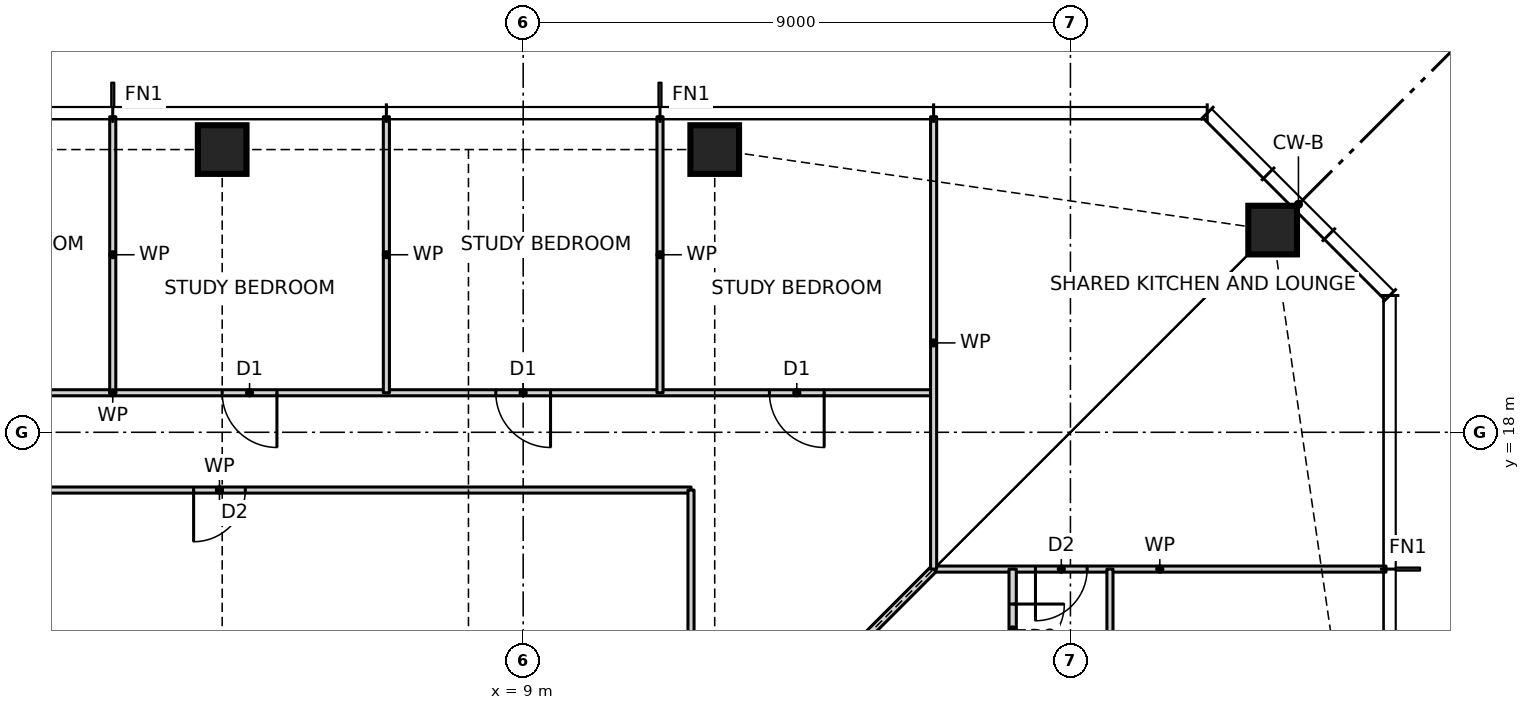
"""IFC4 building model, lengths in metres.
Left out: names, types, materials, properties, quantities, classifications, styles, units other than length and angle.
Written with IfcOpenShell. Run it as: python <this file> out.ifc"""

import sys

from ifc_helpers import new_model, si_unit, direction, frame, frame_2d, origin, origin_2d, place, context, subcontext, project, spatial, rectangle, hollow_rectangle, extrude, element, fill, save


model = new_model("IFC4")
c1 = context("Model", 3, precision=1e-05, world=origin(), true_north=direction((0.0, 1.0)))
c2 = subcontext(c1, "Body", "Model", "MODEL_VIEW")
j1 = project(units=[si_unit("LENGTHUNIT", "METRE"), si_unit("PLANEANGLEUNIT", "RADIAN")], contexts=[c1])
p1 = place(None, origin())
s1 = spatial("IfcSite", under=j1, at=p1, CompositionType="ELEMENT")
p2 = place(p1, origin())
s2 = spatial("IfcBuilding", under=s1, at=p2, CompositionType="ELEMENT")
p3 = place(p2, frame((0.0, 0.0, 46.5)))
s3 = spatial("IfcBuildingStorey", under=s2, at=p3, CompositionType="ELEMENT", Elevation=46.5)
for number, where, z_axis, x_axis in (
    (1, (21.326, 21.326, 0.0), (0.0, 0.0, 1.0), (1.0, 0.0, 0.0)),
    (2, (12.15, 22.65, 0.0), (0.0, 0.0, 1.0), (1.0, 0.0, 0.0)),
    (3, (4.05, 22.65, 0.0), (0.0, 0.0, 1.0), (1.0, 0.0, 0.0)),
):
    element("IfcColumn", number, at=place(p3, frame(where, z_axis=z_axis, x_axis=x_axis)), inside=s3, PredefinedType="COLUMN", context=c2, shape_type="SweptSolid", body=[
        extrude(hollow_rectangle(XDim=0.8, YDim=0.8, WallThickness=0.09, at=origin_2d()), origin(), (0.0, 0.0, 1.0), 3.5),
    ])
p4 = place(p3, frame((15.75, 15.75, 0.0), z_axis=(0.0, 0.0, 1.0), x_axis=(1.0, 0.0, 0.0)))
e4 = element("IfcWall", 4, at=p4, inside=s3, PredefinedType="PARTITIONING", context=c2, shape_type="SweptSolid", body=[
    extrude(rectangle(XDim=7.44, YDim=0.1, at=frame_2d((3.72, 0.0))), origin(), (0.0, 0.0, 1.0), 3.27),
])
p5 = place(p4, frame((1.675, 0.0, 0.0)))
e5 = element("IfcOpeningElement", 5, at=p5, cuts=e4, PredefinedType="OPENING", context=c2, shape_type="SweptSolid", body=[
    extrude(rectangle(XDim=0.85, YDim=2.1, at=frame_2d((0.425, 1.05))), frame((0.0, 0.06, 0.0), z_axis=(0.0, -1.0, 0.0), x_axis=(1.0, 0.0, 0.0)), (0.0, 0.0, 1.0), 0.12),
])
p6 = place(p3, frame((-3.75, 17.05, 0.0), z_axis=(0.0, 0.0, 1.0), x_axis=(1.0, 0.0, 0.0)))
e6 = element("IfcWall", 6, at=p6, inside=s3, PredefinedType="PARTITIONING", context=c2, shape_type="SweptSolid", body=[
    extrude(rectangle(XDim=15.51, YDim=0.1, at=frame_2d((7.755, 0.0))), origin(), (0.0, 0.0, 1.0), 3.27),
])
p7 = place(p6, frame((7.33, 0.0, 0.0)))
e7 = element("IfcOpeningElement", 7, at=p7, cuts=e6, PredefinedType="OPENING", context=c2, shape_type="SweptSolid", body=[
    extrude(rectangle(XDim=0.85, YDim=2.1, at=frame_2d((0.425, 1.05))), frame((0.0, 0.06, 0.0), z_axis=(0.0, -1.0, 0.0), x_axis=(1.0, 0.0, 0.0)), (0.0, 0.0, 1.0), 0.12),
])
p8 = place(p3, frame((-11.25, 18.65, 0.0), z_axis=(0.0, 0.0, 1.0), x_axis=(1.0, 0.0, 0.0)))
e8 = element("IfcWall", 8, at=p8, inside=s3, PredefinedType="PARTITIONING", context=c2, shape_type="SweptSolid", body=[
    extrude(rectangle(XDim=27.0, YDim=0.1, at=frame_2d((13.5, 0.0))), origin(), (0.0, 0.0, 1.0), 3.27),
])
p9 = place(p8, frame((24.3, 0.0, 0.0)))
e9 = element("IfcOpeningElement", 9, at=p9, cuts=e8, PredefinedType="OPENING", context=c2, shape_type="SweptSolid", body=[
    extrude(rectangle(XDim=0.9, YDim=2.1, at=frame_2d((0.45, 1.05))), frame((0.0, 0.06, 0.0), z_axis=(0.0, -1.0, 0.0), x_axis=(1.0, 0.0, 0.0)), (0.0, 0.0, 1.0), 0.12),
])
p10 = place(p8, frame((19.8, 0.0, 0.0)))
e10 = element("IfcOpeningElement", 10, at=p10, cuts=e8, PredefinedType="OPENING", context=c2, shape_type="SweptSolid", body=[
    extrude(rectangle(XDim=0.9, YDim=2.1, at=frame_2d((0.45, 1.05))), frame((0.0, 0.06, 0.0), z_axis=(0.0, -1.0, 0.0), x_axis=(1.0, 0.0, 0.0)), (0.0, 0.0, 1.0), 0.12),
])
p11 = place(p8, frame((15.3, 0.0, 0.0)))
e11 = element("IfcOpeningElement", 11, at=p11, cuts=e8, PredefinedType="OPENING", context=c2, shape_type="SweptSolid", body=[
    extrude(rectangle(XDim=0.9, YDim=2.1, at=frame_2d((0.45, 1.05))), frame((0.0, 0.06, 0.0), z_axis=(0.0, -1.0, 0.0), x_axis=(1.0, 0.0, 0.0)), (0.0, 0.0, 1.0), 0.12),
])
p12 = place(p8, frame((10.8, 0.0, 0.0)))
e12 = element("IfcOpeningElement", 12, at=p12, cuts=e8, PredefinedType="OPENING", context=c2, shape_type="SweptSolid", body=[
    extrude(rectangle(XDim=0.9, YDim=2.1, at=frame_2d((0.45, 1.05))), frame((0.0, 0.06, 0.0), z_axis=(0.0, -1.0, 0.0), x_axis=(1.0, 0.0, 0.0)), (0.0, 0.0, 1.0), 0.12),
])
p13 = place(p8, frame((6.3, 0.0, 0.0)))
e13 = element("IfcOpeningElement", 13, at=p13, cuts=e8, PredefinedType="OPENING", context=c2, shape_type="SweptSolid", body=[
    extrude(rectangle(XDim=0.9, YDim=2.1, at=frame_2d((0.45, 1.05))), frame((0.0, 0.06, 0.0), z_axis=(0.0, -1.0, 0.0), x_axis=(1.0, 0.0, 0.0)), (0.0, 0.0, 1.0), 0.12),
])
p14 = place(p8, frame((1.8, 0.0, 0.0)))
e14 = element("IfcOpeningElement", 14, at=p14, cuts=e8, PredefinedType="OPENING", context=c2, shape_type="SweptSolid", body=[
    extrude(rectangle(XDim=0.9, YDim=2.1, at=frame_2d((0.45, 1.05))), frame((0.0, 0.06, 0.0), z_axis=(0.0, -1.0, 0.0), x_axis=(1.0, 0.0, 0.0)), (0.0, 0.0, 1.0), 0.12),
])
p15 = place(p3, frame((11.6, 11.6, 0.0), z_axis=(0.0, 0.0, 1.0), x_axis=(0.707106781187, 0.707106781187, 0.0)))
e15 = element("IfcWall", 15, at=p15, inside=s3, PredefinedType="PARTITIONING", context=c2, shape_type="SweptSolid", body=[
    extrude(rectangle(XDim=5.869, YDim=0.12, at=frame_2d((2.935, 0.0))), origin(), (0.0, 0.0, 1.0), 2.343),
])
p16 = place(p3, frame((18.65, -15.75, 0.0), z_axis=(0.0, 0.0, 1.0), x_axis=(0.0, 1.0, 0.0)))
e16 = element("IfcWall", 16, at=p16, inside=s3, PredefinedType="PARTITIONING", context=c2, shape_type="SweptSolid", body=[
    extrude(rectangle(XDim=31.5, YDim=0.1, at=frame_2d((15.75, 0.0))), origin(), (0.0, 0.0, 1.0), 3.27),
])
p17 = place(p16, frame((1.8, 0.0, 0.0)))
e17 = element("IfcOpeningElement", 17, at=p17, cuts=e16, PredefinedType="OPENING", context=c2, shape_type="SweptSolid", body=[
    extrude(rectangle(XDim=0.9, YDim=2.1, at=frame_2d((0.45, 1.05))), frame((0.0, 0.06, 0.0), z_axis=(0.0, -1.0, 0.0), x_axis=(1.0, 0.0, 0.0)), (0.0, 0.0, 1.0), 0.12),
])
p18 = place(p16, frame((6.3, 0.0, 0.0)))
e18 = element("IfcOpeningElement", 18, at=p18, cuts=e16, PredefinedType="OPENING", context=c2, shape_type="SweptSolid", body=[
    extrude(rectangle(XDim=0.9, YDim=2.1, at=frame_2d((0.45, 1.05))), frame((0.0, 0.06, 0.0), z_axis=(0.0, -1.0, 0.0), x_axis=(1.0, 0.0, 0.0)), (0.0, 0.0, 1.0), 0.12),
])
p19 = place(p16, frame((10.8, 0.0, 0.0)))
e19 = element("IfcOpeningElement", 19, at=p19, cuts=e16, PredefinedType="OPENING", context=c2, shape_type="SweptSolid", body=[
    extrude(rectangle(XDim=0.9, YDim=2.1, at=frame_2d((0.45, 1.05))), frame((0.0, 0.06, 0.0), z_axis=(0.0, -1.0, 0.0), x_axis=(1.0, 0.0, 0.0)), (0.0, 0.0, 1.0), 0.12),
])
p20 = place(p16, frame((15.3, 0.0, 0.0)))
e20 = element("IfcOpeningElement", 20, at=p20, cuts=e16, PredefinedType="OPENING", context=c2, shape_type="SweptSolid", body=[
    extrude(rectangle(XDim=0.9, YDim=2.1, at=frame_2d((0.45, 1.05))), frame((0.0, 0.06, 0.0), z_axis=(0.0, -1.0, 0.0), x_axis=(1.0, 0.0, 0.0)), (0.0, 0.0, 1.0), 0.12),
])
p21 = place(p16, frame((19.8, 0.0, 0.0)))
e21 = element("IfcOpeningElement", 21, at=p21, cuts=e16, PredefinedType="OPENING", context=c2, shape_type="SweptSolid", body=[
    extrude(rectangle(XDim=0.9, YDim=2.1, at=frame_2d((0.45, 1.05))), frame((0.0, 0.06, 0.0), z_axis=(0.0, -1.0, 0.0), x_axis=(1.0, 0.0, 0.0)), (0.0, 0.0, 1.0), 0.12),
])
p22 = place(p16, frame((24.3, 0.0, 0.0)))
e22 = element("IfcOpeningElement", 22, at=p22, cuts=e16, PredefinedType="OPENING", context=c2, shape_type="SweptSolid", body=[
    extrude(rectangle(XDim=0.9, YDim=2.1, at=frame_2d((0.45, 1.05))), frame((0.0, 0.06, 0.0), z_axis=(0.0, -1.0, 0.0), x_axis=(1.0, 0.0, 0.0)), (0.0, 0.0, 1.0), 0.12),
])
p23 = place(p16, frame((28.8, 0.0, 0.0)))
e23 = element("IfcOpeningElement", 23, at=p23, cuts=e16, PredefinedType="OPENING", context=c2, shape_type="SweptSolid", body=[
    extrude(rectangle(XDim=0.9, YDim=2.1, at=frame_2d((0.45, 1.05))), frame((0.0, 0.06, 0.0), z_axis=(0.0, -1.0, 0.0), x_axis=(1.0, 0.0, 0.0)), (0.0, 0.0, 1.0), 0.12),
])
p24 = place(p3, frame((17.05, 10.65, 0.0), z_axis=(0.0, 0.0, 1.0), x_axis=(0.0, 1.0, 0.0)))
e24 = element("IfcWall", 24, at=p24, inside=s3, PredefinedType="PARTITIONING", context=c2, shape_type="SweptSolid", body=[
    extrude(rectangle(XDim=5.1, YDim=0.12, at=frame_2d((2.55, 0.0))), origin(), (0.0, 0.0, 1.0), 3.27),
])
p25 = place(p24, frame((1.875, 0.0, 0.0)))
e25 = element("IfcOpeningElement", 25, at=p25, cuts=e24, PredefinedType="OPENING", context=c2, shape_type="SweptSolid", body=[
    extrude(rectangle(XDim=0.85, YDim=2.1, at=frame_2d((0.425, 1.05))), frame((0.0, 0.07, 0.0), z_axis=(0.0, -1.0, 0.0), x_axis=(1.0, 0.0, 0.0)), (0.0, 0.0, 1.0), 0.14),
])
p26 = place(p24, frame((3.675, 0.0, 0.0)))
e26 = element("IfcOpeningElement", 26, at=p26, cuts=e24, PredefinedType="OPENING", context=c2, shape_type="SweptSolid", body=[
    extrude(rectangle(XDim=0.85, YDim=2.1, at=frame_2d((0.425, 1.05))), frame((0.0, 0.07, 0.0), z_axis=(0.0, -1.0, 0.0), x_axis=(1.0, 0.0, 0.0)), (0.0, 0.0, 1.0), 0.14),
])
p27 = place(p3, frame((15.75, 15.75, 0.0), z_axis=(0.0, 0.0, 1.0), x_axis=(0.0, 1.0, 0.0)))
e27 = element("IfcWall", 27, at=p27, inside=s3, PredefinedType="PARTITIONING", context=c2, shape_type="SweptSolid", body=[
    extrude(rectangle(XDim=7.44, YDim=0.1, at=frame_2d((3.72, 0.0))), origin(), (0.0, 0.0, 1.0), 3.27),
])
p28 = place(p3, frame((11.76, 11.76, 0.0), z_axis=(0.0, 0.0, 1.0), x_axis=(0.0, 1.0, 0.0)))
e28 = element("IfcWall", 28, at=p28, inside=s3, PredefinedType="PARTITIONING", context=c2, shape_type="SweptSolid", body=[
    extrude(rectangle(XDim=5.29, YDim=0.1, at=frame_2d((2.645, 0.0))), origin(), (0.0, 0.0, 1.0), 3.27),
])
for number, where, z_axis, x_axis in (
    (29, (11.25, 18.65, 0.0), (0.0, 0.0, 1.0), (0.0, 1.0, 0.0)),
    (30, (6.75, 18.65, 0.0), (0.0, 0.0, 1.0), (0.0, 1.0, 0.0)),
    (31, (2.25, 18.65, 0.0), (0.0, 0.0, 1.0), (0.0, 1.0, 0.0)),
):
    element("IfcWall", number, at=place(p3, frame(where, z_axis=z_axis, x_axis=x_axis)), inside=s3, PredefinedType="PARTITIONING", context=c2, shape_type="SweptSolid", body=[
        extrude(rectangle(XDim=4.54, YDim=0.1, at=frame_2d((2.27, 0.0))), origin(), (0.0, 0.0, 1.0), 3.27),
    ])
p29 = place(p26, frame((0.85, 0.0, 0.0), z_axis=(0.0, 0.0, 1.0), x_axis=(-1.0, 0.0, 0.0)))
e32 = element("IfcDoor", 32, at=p29, inside=s3, OperationType="SINGLE_SWING_LEFT", PredefinedType="DOOR", context=c2, shape_type="SweptSolid", body=[
    extrude(rectangle(XDim=0.85, YDim=2.1, at=frame_2d((0.425, 1.05))), frame((0.0, 0.025, 0.0), z_axis=(0.0, -1.0, 0.0), x_axis=(1.0, 0.0, 0.0)), (0.0, 0.0, 1.0), 0.05),
])
fill(e26, e32)
p30 = place(p9, frame((0.9, 0.0, 0.0), z_axis=(0.0, 0.0, 1.0), x_axis=(-1.0, 0.0, 0.0)))
e33 = element("IfcDoor", 33, at=p30, inside=s3, OperationType="SINGLE_SWING_LEFT", PredefinedType="DOOR", context=c2, shape_type="SweptSolid", body=[
    extrude(rectangle(XDim=0.9, YDim=2.1, at=frame_2d((0.45, 1.05))), frame((0.0, 0.025, 0.0), z_axis=(0.0, -1.0, 0.0), x_axis=(1.0, 0.0, 0.0)), (0.0, 0.0, 1.0), 0.05),
])
fill(e9, e33)
p31 = place(p10, frame((0.9, 0.0, 0.0), z_axis=(0.0, 0.0, 1.0), x_axis=(-1.0, 0.0, 0.0)))
e34 = element("IfcDoor", 34, at=p31, inside=s3, OperationType="SINGLE_SWING_LEFT", PredefinedType="DOOR", context=c2, shape_type="SweptSolid", body=[
    extrude(rectangle(XDim=0.9, YDim=2.1, at=frame_2d((0.45, 1.05))), frame((0.0, 0.025, 0.0), z_axis=(0.0, -1.0, 0.0), x_axis=(1.0, 0.0, 0.0)), (0.0, 0.0, 1.0), 0.05),
])
fill(e10, e34)
p32 = place(p11, frame((0.9, 0.0, 0.0), z_axis=(0.0, 0.0, 1.0), x_axis=(-1.0, 0.0, 0.0)))
e35 = element("IfcDoor", 35, at=p32, inside=s3, OperationType="SINGLE_SWING_LEFT", PredefinedType="DOOR", context=c2, shape_type="SweptSolid", body=[
    extrude(rectangle(XDim=0.9, YDim=2.1, at=frame_2d((0.45, 1.05))), frame((0.0, 0.025, 0.0), z_axis=(0.0, -1.0, 0.0), x_axis=(1.0, 0.0, 0.0)), (0.0, 0.0, 1.0), 0.05),
])
fill(e11, e35)
p33 = place(p7, frame((0.85, 0.0, 0.0), z_axis=(0.0, 0.0, 1.0), x_axis=(-1.0, 0.0, 0.0)))
e36 = element("IfcDoor", 36, at=p33, inside=s3, OperationType="SINGLE_SWING_RIGHT", PredefinedType="DOOR", context=c2, shape_type="SweptSolid", body=[
    extrude(rectangle(XDim=0.85, YDim=2.1, at=frame_2d((0.425, 1.05))), frame((0.0, 0.025, 0.0), z_axis=(0.0, -1.0, 0.0), x_axis=(1.0, 0.0, 0.0)), (0.0, 0.0, 1.0), 0.05),
])
fill(e7, e36)
p34 = place(p5, frame((0.85, 0.0, 0.0), z_axis=(0.0, 0.0, 1.0), x_axis=(-1.0, 0.0, 0.0)))
e37 = element("IfcDoor", 37, at=p34, inside=s3, OperationType="SINGLE_SWING_RIGHT", PredefinedType="DOOR", context=c2, shape_type="SweptSolid", body=[
    extrude(rectangle(XDim=0.85, YDim=2.1, at=frame_2d((0.425, 1.05))), frame((0.0, 0.025, 0.0), z_axis=(0.0, -1.0, 0.0), x_axis=(1.0, 0.0, 0.0)), (0.0, 0.0, 1.0), 0.05),
])
fill(e5, e37)
save(model, sys.argv[1])
